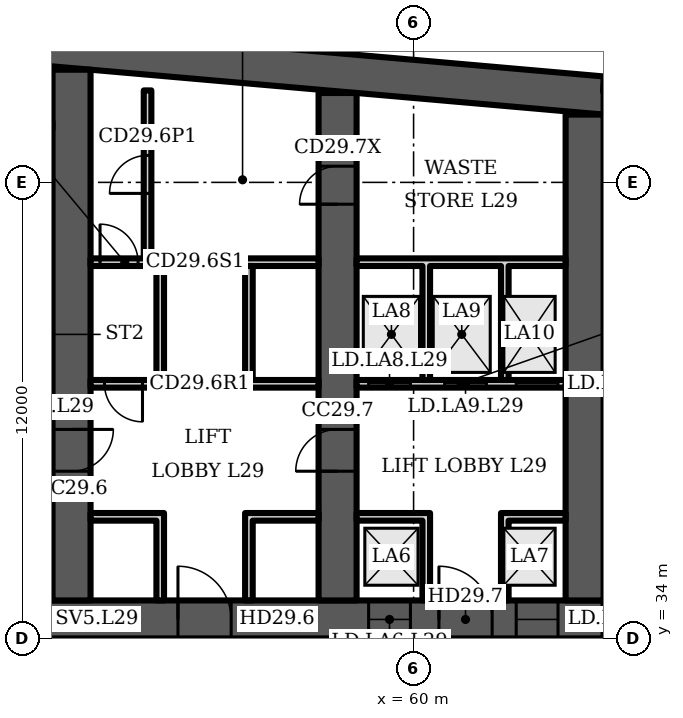
"""IFC4 building model, lengths in metres.
Left out: names, types, materials, properties, quantities, classifications, styles, units other than length and angle.
Written with IfcOpenShell. Run it as: python <this file> out.ifc"""

import sys

from ifc_helpers import new_model, si_unit, direction, frame, frame_2d, origin, place, context, subcontext, project, spatial, polyline, rectangle, outline, extrude, element, fill, save


model = new_model("IFC4")
c1 = context("Model", 3, precision=1e-05, world=origin(), true_north=direction((0.0, 1.0)))
c2 = subcontext(c1, "Body", "Model", "MODEL_VIEW")
j1 = project(units=[si_unit("LENGTHUNIT", "METRE"), si_unit("PLANEANGLEUNIT", "RADIAN")], contexts=[c1])
p1 = place(None, origin())
s1 = spatial("IfcSite", under=j1, at=p1, CompositionType="ELEMENT")
p2 = place(p1, origin())
s2 = spatial("IfcBuilding", under=s1, at=p2, CompositionType="ELEMENT")
p3 = place(p2, frame((0.0, 0.0, 125.5)))
s3 = spatial("IfcBuildingStorey", under=s2, at=p3, CompositionType="ELEMENT", Elevation=125.5)
p4 = place(p3, origin())
e1 = element("IfcWall", 1, at=p4, inside=s3, PredefinedType="SHEAR", context=c2, shape_type="SweptSolid", body=[
    extrude(outline(polyline([(16.0, 47.784), (40.5, 49.927), (65.0, 47.784), (65.0, 48.787), (40.5, 50.931), (16.0, 48.787), (16.0, 47.784)])), origin(), (0.0, 0.0, 1.0), 3.6),
])
p5 = place(p3, frame((16.0, 34.5, 0.0), z_axis=(0.0, 0.0, 1.0), x_axis=(1.0, 0.0, 0.0)))
e2 = element("IfcWall", 2, at=p5, inside=s3, PredefinedType="SHEAR", context=c2, shape_type="SweptSolid", body=[
    extrude(rectangle(XDim=49.0, YDim=1.0, at=frame_2d((24.5, 0.0))), origin(), (0.0, 0.0, 1.0), 3.6),
])
p6 = place(p5, frame((1.2, 0.0, 0.0)))
e3 = element("IfcOpeningElement", 3, at=p6, cuts=e2, PredefinedType="OPENING", context=c2, shape_type="SweptSolid", body=[
    extrude(rectangle(XDim=1.1, YDim=2.1, at=frame_2d((0.55, 1.05))), frame((0.0, 0.51, 0.0), z_axis=(0.0, -1.0, 0.0), x_axis=(1.0, 0.0, 0.0)), (0.0, 0.0, 1.0), 1.02),
])
p7 = place(p5, frame((5.083, 0.0, 0.0)))
e4 = element("IfcOpeningElement", 4, at=p7, cuts=e2, PredefinedType="OPENING", context=c2, shape_type="SweptSolid", body=[
    extrude(rectangle(XDim=1.1, YDim=2.1, at=frame_2d((0.55, 1.05))), frame((0.0, 0.51, 0.0), z_axis=(0.0, -1.0, 0.0), x_axis=(1.0, 0.0, 0.0)), (0.0, 0.0, 1.0), 1.02),
])
p8 = place(p5, frame((2.933, 0.0, 0.0)))
e5 = element("IfcOpeningElement", 5, at=p8, cuts=e2, PredefinedType="OPENING", context=c2, shape_type="SweptSolid", body=[
    extrude(rectangle(XDim=1.4, YDim=2.1, at=frame_2d((0.7, 1.05))), frame((0.0, 0.51, 0.0), z_axis=(0.0, -1.0, 0.0), x_axis=(1.0, 0.0, 0.0)), (0.0, 0.0, 1.0), 1.02),
])
p9 = place(p5, frame((7.65, 0.0, 0.0)))
e6 = element("IfcOpeningElement", 6, at=p9, cuts=e2, PredefinedType="OPENING", context=c2, shape_type="SweptSolid", body=[
    extrude(rectangle(XDim=1.2, YDim=2.1, at=frame_2d((0.6, 1.05))), frame((0.0, 0.51, 0.0), z_axis=(0.0, -1.0, 0.0), x_axis=(1.0, 0.0, 0.0)), (0.0, 0.0, 1.0), 1.02),
])
p10 = place(p5, frame((14.817, 0.0, 0.0)))
e7 = element("IfcOpeningElement", 7, at=p10, cuts=e2, PredefinedType="OPENING", context=c2, shape_type="SweptSolid", body=[
    extrude(rectangle(XDim=1.1, YDim=2.1, at=frame_2d((0.55, 1.05))), frame((0.0, 0.51, 0.0), z_axis=(0.0, -1.0, 0.0), x_axis=(1.0, 0.0, 0.0)), (0.0, 0.0, 1.0), 1.02),
])
p11 = place(p5, frame((19.083, 0.0, 0.0)))
e8 = element("IfcOpeningElement", 8, at=p11, cuts=e2, PredefinedType="OPENING", context=c2, shape_type="SweptSolid", body=[
    extrude(rectangle(XDim=1.1, YDim=2.1, at=frame_2d((0.55, 1.05))), frame((0.0, 0.51, 0.0), z_axis=(0.0, -1.0, 0.0), x_axis=(1.0, 0.0, 0.0)), (0.0, 0.0, 1.0), 1.02),
])
p12 = place(p5, frame((16.8, 0.0, 0.0)))
e9 = element("IfcOpeningElement", 9, at=p12, cuts=e2, PredefinedType="OPENING", context=c2, shape_type="SweptSolid", body=[
    extrude(rectangle(XDim=1.4, YDim=2.1, at=frame_2d((0.7, 1.05))), frame((0.0, 0.51, 0.0), z_axis=(0.0, -1.0, 0.0), x_axis=(1.0, 0.0, 0.0)), (0.0, 0.0, 1.0), 1.02),
])
p13 = place(p5, frame((21.817, 0.0, 0.0)))
e10 = element("IfcOpeningElement", 10, at=p13, cuts=e2, PredefinedType="OPENING", context=c2, shape_type="SweptSolid", body=[
    extrude(rectangle(XDim=1.1, YDim=2.1, at=frame_2d((0.55, 1.05))), frame((0.0, 0.51, 0.0), z_axis=(0.0, -1.0, 0.0), x_axis=(1.0, 0.0, 0.0)), (0.0, 0.0, 1.0), 1.02),
])
p14 = place(p5, frame((26.083, 0.0, 0.0)))
e11 = element("IfcOpeningElement", 11, at=p14, cuts=e2, PredefinedType="OPENING", context=c2, shape_type="SweptSolid", body=[
    extrude(rectangle(XDim=1.1, YDim=2.1, at=frame_2d((0.55, 1.05))), frame((0.0, 0.51, 0.0), z_axis=(0.0, -1.0, 0.0), x_axis=(1.0, 0.0, 0.0)), (0.0, 0.0, 1.0), 1.02),
])
p15 = place(p5, frame((33.15, 0.0, 0.0)))
e12 = element("IfcOpeningElement", 12, at=p15, cuts=e2, PredefinedType="OPENING", context=c2, shape_type="SweptSolid", body=[
    extrude(rectangle(XDim=1.2, YDim=2.1, at=frame_2d((0.6, 1.05))), frame((0.0, 0.51, 0.0), z_axis=(0.0, -1.0, 0.0), x_axis=(1.0, 0.0, 0.0)), (0.0, 0.0, 1.0), 1.02),
])
p16 = place(p5, frame((37.8, 0.0, 0.0)))
e13 = element("IfcOpeningElement", 13, at=p16, cuts=e2, PredefinedType="OPENING", context=c2, shape_type="SweptSolid", body=[
    extrude(rectangle(XDim=1.4, YDim=2.1, at=frame_2d((0.7, 1.05))), frame((0.0, 0.51, 0.0), z_axis=(0.0, -1.0, 0.0), x_axis=(1.0, 0.0, 0.0)), (0.0, 0.0, 1.0), 1.02),
])
p17 = place(p5, frame((42.817, 0.0, 0.0)))
e14 = element("IfcOpeningElement", 14, at=p17, cuts=e2, PredefinedType="OPENING", context=c2, shape_type="SweptSolid", body=[
    extrude(rectangle(XDim=1.1, YDim=2.1, at=frame_2d((0.55, 1.05))), frame((0.0, 0.51, 0.0), z_axis=(0.0, -1.0, 0.0), x_axis=(1.0, 0.0, 0.0)), (0.0, 0.0, 1.0), 1.02),
])
p18 = place(p5, frame((46.7, 0.0, 0.0)))
e15 = element("IfcOpeningElement", 15, at=p18, cuts=e2, PredefinedType="OPENING", context=c2, shape_type="SweptSolid", body=[
    extrude(rectangle(XDim=1.1, YDim=2.1, at=frame_2d((0.55, 1.05))), frame((0.0, 0.51, 0.0), z_axis=(0.0, -1.0, 0.0), x_axis=(1.0, 0.0, 0.0)), (0.0, 0.0, 1.0), 1.02),
])
p19 = place(p5, frame((44.667, 0.0, 0.0)))
e16 = element("IfcOpeningElement", 16, at=p19, cuts=e2, PredefinedType="OPENING", context=c2, shape_type="SweptSolid", body=[
    extrude(rectangle(XDim=1.4, YDim=2.1, at=frame_2d((0.7, 1.05))), frame((0.0, 0.51, 0.0), z_axis=(0.0, -1.0, 0.0), x_axis=(1.0, 0.0, 0.0)), (0.0, 0.0, 1.0), 1.02),
])
p20 = place(p3, frame((51.0, 35.0, 0.0), z_axis=(0.0, 0.0, 1.0), x_axis=(0.0, 1.0, 0.0)))
e17 = element("IfcWall", 17, at=p20, inside=s3, PredefinedType="SHEAR", context=c2, shape_type="SweptSolid", body=[
    extrude(rectangle(XDim=13.965, YDim=1.0, at=frame_2d((6.982, 0.0))), origin(), (0.0, 0.0, 1.0), 3.6),
])
p21 = place(p20, frame((3.4, 0.0, 0.0)))
e18 = element("IfcOpeningElement", 18, at=p21, cuts=e17, PredefinedType="OPENING", context=c2, shape_type="SweptSolid", body=[
    extrude(rectangle(XDim=1.1, YDim=2.1, at=frame_2d((0.55, 1.05))), frame((0.0, 0.51, 0.0), z_axis=(0.0, -1.0, 0.0), x_axis=(1.0, 0.0, 0.0)), (0.0, 0.0, 1.0), 1.02),
])
p22 = place(p3, frame((58.0, 35.0, 0.0), z_axis=(0.0, 0.0, 1.0), x_axis=(0.0, 1.0, 0.0)))
e19 = element("IfcWall", 19, at=p22, inside=s3, PredefinedType="SHEAR", context=c2, shape_type="SweptSolid", body=[
    extrude(rectangle(XDim=13.352, YDim=1.0, at=frame_2d((6.676, 0.0))), origin(), (0.0, 0.0, 1.0), 3.6),
])
p23 = place(p22, frame((10.426, 0.0, 0.0)))
e20 = element("IfcOpeningElement", 20, at=p23, cuts=e19, PredefinedType="OPENING", context=c2, shape_type="SweptSolid", body=[
    extrude(rectangle(XDim=1.0, YDim=2.1, at=frame_2d((0.5, 1.05))), frame((0.0, 0.51, 0.0), z_axis=(0.0, -1.0, 0.0), x_axis=(1.0, 0.0, 0.0)), (0.0, 0.0, 1.0), 1.02),
])
p24 = place(p22, frame((3.4, 0.0, 0.0)))
e21 = element("IfcOpeningElement", 21, at=p24, cuts=e19, PredefinedType="OPENING", context=c2, shape_type="SweptSolid", body=[
    extrude(rectangle(XDim=1.1, YDim=2.1, at=frame_2d((0.55, 1.05))), frame((0.0, 0.51, 0.0), z_axis=(0.0, -1.0, 0.0), x_axis=(1.0, 0.0, 0.0)), (0.0, 0.0, 1.0), 1.02),
])
p25 = place(p3, frame((64.5, 35.0, 0.0), z_axis=(0.0, 0.0, 1.0), x_axis=(0.0, 1.0, 0.0)))
e22 = element("IfcWall", 22, at=p25, inside=s3, PredefinedType="SHEAR", context=c2, shape_type="SweptSolid", body=[
    extrude(rectangle(XDim=12.784, YDim=1.0, at=frame_2d((6.392, 0.0))), origin(), (0.0, 0.0, 1.0), 3.6),
])
p26 = place(p3, frame((67.983, 48.326, 0.0), z_axis=(0.0, 0.0, 1.0), x_axis=(-0.996194, 0.087168, 0.0)))
e23 = element("IfcWall", 23, at=p26, inside=s3, PredefinedType="SOLIDWALL", context=c2, shape_type="SweptSolid", body=[
    extrude(rectangle(XDim=2.994, YDim=0.4, at=frame_2d((1.497, 0.0))), origin(), (0.0, 0.0, 1.0), 3.2),
])
p27 = place(p3, frame((51.5, 40.7, 0.0), z_axis=(0.0, 0.0, 1.0), x_axis=(1.0, 0.0, 0.0)))
e24 = element("IfcWall", 24, at=p27, inside=s3, PredefinedType="PARTITIONING", context=c2, shape_type="SweptSolid", body=[
    extrude(rectangle(XDim=6.0, YDim=0.2, at=frame_2d((3.0, 0.0))), origin(), (0.0, 0.0, 1.0), 3.2),
])
p28 = place(p27, frame((0.367, 0.0, 0.0)))
e25 = element("IfcOpeningElement", 25, at=p28, cuts=e24, PredefinedType="OPENING", context=c2, shape_type="SweptSolid", body=[
    extrude(rectangle(XDim=1.0, YDim=2.1, at=frame_2d((0.5, 1.05))), frame((0.0, 0.11, 0.0), z_axis=(0.0, -1.0, 0.0), x_axis=(1.0, 0.0, 0.0)), (0.0, 0.0, 1.0), 0.22),
])
p29 = place(p3, frame((51.5, 43.9, 0.0), z_axis=(0.0, 0.0, 1.0), x_axis=(1.0, 0.0, 0.0)))
e26 = element("IfcWall", 26, at=p29, inside=s3, PredefinedType="PARTITIONING", context=c2, shape_type="SweptSolid", body=[
    extrude(rectangle(XDim=6.0, YDim=0.2, at=frame_2d((3.0, 0.0))), origin(), (0.0, 0.0, 1.0), 3.2),
])
p30 = place(p29, frame((0.25, 0.0, 0.0)))
e27 = element("IfcOpeningElement", 27, at=p30, cuts=e26, PredefinedType="OPENING", context=c2, shape_type="SweptSolid", body=[
    extrude(rectangle(XDim=1.0, YDim=2.1, at=frame_2d((0.5, 1.05))), frame((0.0, 0.11, 0.0), z_axis=(0.0, -1.0, 0.0), x_axis=(1.0, 0.0, 0.0)), (0.0, 0.0, 1.0), 0.22),
])
p31 = place(p3, frame((0.0, 0.0, -0.0)))
e28 = element("IfcWall", 28, at=p31, inside=s3, PredefinedType="PARTITIONING", context=c2, shape_type="SweptSolid", body=[
    extrude(outline(polyline([(53.233, 37.1), (51.5, 37.1), (51.5, 37.3), (53.233, 37.3), (53.433, 37.3), (53.433, 35.0), (53.233, 35.0), (53.233, 37.1)])), origin(), (0.0, 0.0, 1.0), 3.2),
])
p32 = place(p3, frame((0.0, 0.0, -0.0)))
e29 = element("IfcWall", 29, at=p32, inside=s3, PredefinedType="PARTITIONING", context=c2, shape_type="SweptSolid", body=[
    extrude(outline(polyline([(55.567, 37.3), (55.767, 37.3), (57.5, 37.3), (57.5, 37.1), (55.767, 37.1), (55.767, 35.0), (55.567, 35.0), (55.567, 37.3)])), origin(), (0.0, 0.0, 1.0), 3.2),
])
p33 = place(p3, frame((0.0, 0.0, -0.0)))
e30 = element("IfcWall", 30, at=p33, inside=s3, PredefinedType="PARTITIONING", context=c2, shape_type="SweptSolid", body=[
    extrude(outline(polyline([(53.233, 40.8), (53.233, 43.8), (53.433, 43.8), (53.433, 40.8), (53.233, 40.8)])), origin(), (0.0, 0.0, 1.0), 3.2),
])
p34 = place(p3, frame((0.0, 0.0, -0.0)))
e31 = element("IfcWall", 31, at=p34, inside=s3, PredefinedType="PARTITIONING", context=c2, shape_type="SweptSolid", body=[
    extrude(outline(polyline([(55.567, 40.8), (55.567, 43.8), (55.767, 43.8), (55.767, 40.8), (55.567, 40.8)])), origin(), (0.0, 0.0, 1.0), 3.2),
])
p35 = place(p3, frame((53.0, 44.0, 0.0), z_axis=(0.0, 0.0, 1.0), x_axis=(0.0, 1.0, 0.0)))
e32 = element("IfcWall", 32, at=p35, inside=s3, PredefinedType="PARTITIONING", context=c2, shape_type="SweptSolid", body=[
    extrude(rectangle(XDim=4.42, YDim=0.2, at=frame_2d((2.21, 0.0))), origin(), (0.0, 0.0, 1.0), 3.2),
])
p36 = place(p35, frame((1.71, 0.0, 0.0)))
e33 = element("IfcOpeningElement", 33, at=p36, cuts=e32, PredefinedType="OPENING", context=c2, shape_type="SweptSolid", body=[
    extrude(rectangle(XDim=1.0, YDim=2.1, at=frame_2d((0.5, 1.05))), frame((0.0, 0.11, 0.0), z_axis=(0.0, -1.0, 0.0), x_axis=(1.0, 0.0, 0.0)), (0.0, 0.0, 1.0), 0.22),
])
p37 = place(p3, frame((58.5, 40.7, 0.0), z_axis=(0.0, 0.0, 1.0), x_axis=(1.0, 0.0, 0.0)))
e34 = element("IfcWall", 34, at=p37, inside=s3, PredefinedType="PARTITIONING", context=c2, shape_type="SweptSolid", body=[
    extrude(rectangle(XDim=5.5, YDim=0.2, at=frame_2d((2.75, 0.0))), origin(), (0.0, 0.0, 1.0), 3.2),
])
p38 = place(p37, frame((0.317, 0.0, 0.0)))
e35 = element("IfcOpeningElement", 35, at=p38, cuts=e34, PredefinedType="OPENING", context=c2, shape_type="SweptSolid", body=[
    extrude(rectangle(XDim=1.1, YDim=2.1, at=frame_2d((0.55, 1.05))), frame((0.0, 0.11, 0.0), z_axis=(0.0, -1.0, 0.0), x_axis=(1.0, 0.0, 0.0)), (0.0, 0.0, 1.0), 0.22),
])
p39 = place(p37, frame((2.317, 0.0, 0.0)))
e36 = element("IfcOpeningElement", 36, at=p39, cuts=e34, PredefinedType="OPENING", context=c2, shape_type="SweptSolid", body=[
    extrude(rectangle(XDim=1.1, YDim=2.1, at=frame_2d((0.55, 1.05))), frame((0.0, 0.11, 0.0), z_axis=(0.0, -1.0, 0.0), x_axis=(1.0, 0.0, 0.0)), (0.0, 0.0, 1.0), 0.22),
])
p40 = place(p37, frame((4.2, 0.0, 0.0)))
e37 = element("IfcOpeningElement", 37, at=p40, cuts=e34, PredefinedType="OPENING", context=c2, shape_type="SweptSolid", body=[
    extrude(rectangle(XDim=1.1, YDim=2.1, at=frame_2d((0.55, 1.05))), frame((0.0, 0.11, 0.0), z_axis=(0.0, -1.0, 0.0), x_axis=(1.0, 0.0, 0.0)), (0.0, 0.0, 1.0), 0.22),
])
p41 = place(p3, frame((0.0, 0.0, -0.0)))
e38 = element("IfcWall", 38, at=p41, inside=s3, PredefinedType="PARTITIONING", context=c2, shape_type="SweptSolid", body=[
    extrude(outline(polyline([(60.233, 37.1), (58.5, 37.1), (58.5, 37.3), (60.233, 37.3), (60.433, 37.3), (60.433, 35.0), (60.233, 35.0), (60.233, 37.1)])), origin(), (0.0, 0.0, 1.0), 3.2),
])
p42 = place(p3, frame((0.0, 0.0, -0.0)))
e39 = element("IfcWall", 39, at=p42, inside=s3, PredefinedType="PARTITIONING", context=c2, shape_type="SweptSolid", body=[
    extrude(outline(polyline([(62.3, 37.3), (62.5, 37.3), (64.0, 37.3), (64.0, 37.1), (62.5, 37.1), (62.5, 35.0), (62.3, 35.0), (62.3, 37.3)])), origin(), (0.0, 0.0, 1.0), 3.2),
])
p43 = place(p3, frame((0.0, 0.0, -0.0)))
e40 = element("IfcWall", 40, at=p43, inside=s3, PredefinedType="PARTITIONING", context=c2, shape_type="SweptSolid", body=[
    extrude(outline(polyline([(60.433, 40.8), (60.233, 40.8), (60.233, 43.8), (58.5, 43.8), (58.5, 44.0), (64.0, 44.0), (64.0, 43.8), (62.5, 43.8), (62.5, 40.8), (62.3, 40.8), (62.3, 43.8), (60.433, 43.8), (60.433, 40.8)])), origin(), (0.0, 0.0, 1.0), 3.2),
])
p44 = place(p16, origin())
e41 = element("IfcDoor", 41, at=p44, inside=s3, OperationType="DOUBLE_DOOR_SINGLE_SWING", PredefinedType="DOOR", context=c2, shape_type="SweptSolid", body=[
    extrude(rectangle(XDim=1.4, YDim=2.1, at=frame_2d((0.7, 1.05))), frame((0.0, 0.025, 0.0), z_axis=(0.0, -1.0, 0.0), x_axis=(1.0, 0.0, 0.0)), (0.0, 0.0, 1.0), 0.05),
])
fill(e13, e41)
p45 = place(p28, origin())
e42 = element("IfcDoor", 42, at=p45, inside=s3, OperationType="SINGLE_SWING_RIGHT", PredefinedType="DOOR", context=c2, shape_type="SweptSolid", body=[
    extrude(rectangle(XDim=1.0, YDim=2.1, at=frame_2d((0.5, 1.05))), frame((0.0, 0.025, 0.0), z_axis=(0.0, -1.0, 0.0), x_axis=(1.0, 0.0, 0.0)), (0.0, 0.0, 1.0), 0.05),
])
fill(e25, e42)
p46 = place(p30, origin())
e43 = element("IfcDoor", 43, at=p46, inside=s3, OperationType="SINGLE_SWING_LEFT", PredefinedType="DOOR", context=c2, shape_type="SweptSolid", body=[
    extrude(rectangle(XDim=1.0, YDim=2.1, at=frame_2d((0.5, 1.05))), frame((0.0, 0.025, 0.0), z_axis=(0.0, -1.0, 0.0), x_axis=(1.0, 0.0, 0.0)), (0.0, 0.0, 1.0), 0.05),
])
fill(e27, e43)
p47 = place(p36, origin())
e44 = element("IfcDoor", 44, at=p47, inside=s3, OperationType="SINGLE_SWING_LEFT", PredefinedType="DOOR", context=c2, shape_type="SweptSolid", body=[
    extrude(rectangle(XDim=1.0, YDim=2.1, at=frame_2d((0.5, 1.05))), frame((0.0, 0.025, 0.0), z_axis=(0.0, -1.0, 0.0), x_axis=(1.0, 0.0, 0.0)), (0.0, 0.0, 1.0), 0.05),
])
fill(e33, e44)
p48 = place(p17, origin())
e45 = element("IfcDoor", 45, at=p48, inside=s3, OperationType="DOUBLE_DOOR_SLIDING", PredefinedType="DOOR", context=c2, shape_type="SweptSolid", body=[
    extrude(rectangle(XDim=1.1, YDim=2.1, at=frame_2d((0.55, 1.05))), frame((0.0, 0.025, 0.0), z_axis=(0.0, -1.0, 0.0), x_axis=(1.0, 0.0, 0.0)), (0.0, 0.0, 1.0), 0.05),
])
fill(e14, e45)
p49 = place(p18, origin())
e46 = element("IfcDoor", 46, at=p49, inside=s3, OperationType="DOUBLE_DOOR_SLIDING", PredefinedType="DOOR", context=c2, shape_type="SweptSolid", body=[
    extrude(rectangle(XDim=1.1, YDim=2.1, at=frame_2d((0.55, 1.05))), frame((0.0, 0.025, 0.0), z_axis=(0.0, -1.0, 0.0), x_axis=(1.0, 0.0, 0.0)), (0.0, 0.0, 1.0), 0.05),
])
fill(e15, e46)
p50 = place(p19, origin())
e47 = element("IfcDoor", 47, at=p50, inside=s3, OperationType="DOUBLE_DOOR_SINGLE_SWING", PredefinedType="DOOR", context=c2, shape_type="SweptSolid", body=[
    extrude(rectangle(XDim=1.4, YDim=2.1, at=frame_2d((0.7, 1.05))), frame((0.0, 0.025, 0.0), z_axis=(0.0, -1.0, 0.0), x_axis=(1.0, 0.0, 0.0)), (0.0, 0.0, 1.0), 0.05),
])
fill(e16, e47)
p51 = place(p38, origin())
e48 = element("IfcDoor", 48, at=p51, inside=s3, OperationType="DOUBLE_DOOR_SLIDING", PredefinedType="DOOR", context=c2, shape_type="SweptSolid", body=[
    extrude(rectangle(XDim=1.1, YDim=2.1, at=frame_2d((0.55, 1.05))), frame((0.0, 0.025, 0.0), z_axis=(0.0, -1.0, 0.0), x_axis=(1.0, 0.0, 0.0)), (0.0, 0.0, 1.0), 0.05),
])
fill(e35, e48)
p52 = place(p39, origin())
e49 = element("IfcDoor", 49, at=p52, inside=s3, OperationType="DOUBLE_DOOR_SLIDING", PredefinedType="DOOR", context=c2, shape_type="SweptSolid", body=[
    extrude(rectangle(XDim=1.1, YDim=2.1, at=frame_2d((0.55, 1.05))), frame((0.0, 0.025, 0.0), z_axis=(0.0, -1.0, 0.0), x_axis=(1.0, 0.0, 0.0)), (0.0, 0.0, 1.0), 0.05),
])
fill(e36, e49)
p53 = place(p40, origin())
e50 = element("IfcDoor", 50, at=p53, inside=s3, OperationType="DOUBLE_DOOR_SLIDING", PredefinedType="DOOR", context=c2, shape_type="SweptSolid", body=[
    extrude(rectangle(XDim=1.1, YDim=2.1, at=frame_2d((0.55, 1.05))), frame((0.0, 0.025, 0.0), z_axis=(0.0, -1.0, 0.0), x_axis=(1.0, 0.0, 0.0)), (0.0, 0.0, 1.0), 0.05),
])
fill(e37, e50)
p54 = place(p23, origin())
e51 = element("IfcDoor", 51, at=p54, inside=s3, OperationType="SINGLE_SWING_LEFT", PredefinedType="DOOR", context=c2, shape_type="SweptSolid", body=[
    extrude(rectangle(XDim=1.0, YDim=2.1, at=frame_2d((0.5, 1.05))), frame((0.0, 0.5, 0.0), z_axis=(0.0, -1.0, 0.0), x_axis=(1.0, 0.0, 0.0)), (0.0, 0.0, 1.0), 1.0),
])
fill(e20, e51)
p55 = place(p21, origin())
e52 = element("IfcDoor", 52, at=p55, inside=s3, OperationType="SINGLE_SWING_RIGHT", PredefinedType="DOOR", context=c2, shape_type="SweptSolid", body=[
    extrude(rectangle(XDim=1.1, YDim=2.1, at=frame_2d((0.55, 1.05))), frame((0.0, 0.025, 0.0), z_axis=(0.0, -1.0, 0.0), x_axis=(1.0, 0.0, 0.0)), (0.0, 0.0, 1.0), 0.05),
])
fill(e18, e52)
p56 = place(p24, origin())
e53 = element("IfcDoor", 53, at=p56, inside=s3, OperationType="SINGLE_SWING_LEFT", PredefinedType="DOOR", context=c2, shape_type="SweptSolid", body=[
    extrude(rectangle(XDim=1.1, YDim=2.1, at=frame_2d((0.55, 1.05))), frame((0.0, 0.025, 0.0), z_axis=(0.0, -1.0, 0.0), x_axis=(1.0, 0.0, 0.0)), (0.0, 0.0, 1.0), 0.05),
])
fill(e21, e53)
save(model, sys.argv[1])
